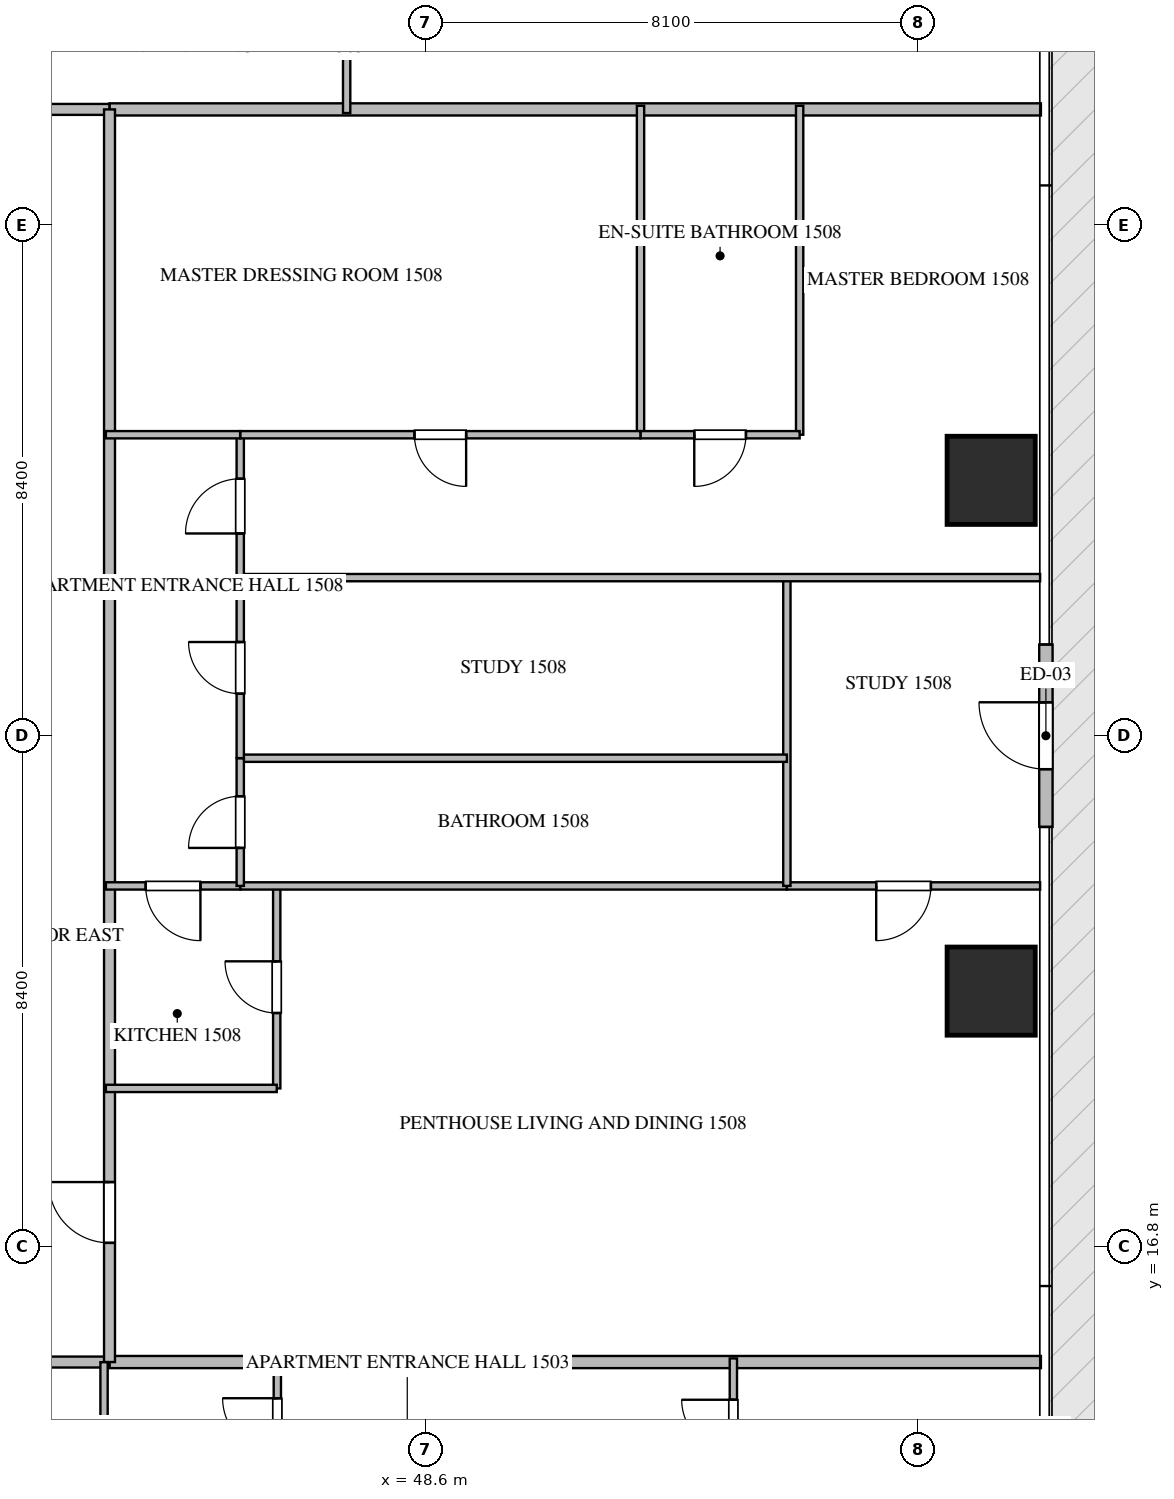
"""IFC4 building model, lengths in metres.
Left out: names, types, materials, properties, quantities, classifications, styles, units other than length and angle.
Written with IfcOpenShell. Run it as: python <this file> out.ifc"""

import sys

from ifc_helpers import new_model, si_unit, direction, frame, frame_2d, origin, origin_2d, place, context, subcontext, project, spatial, rectangle, extrude, source, transform, mapped, element, fill, save


model = new_model("IFC4")
c1 = context("Model", 3, precision=1e-05, world=origin(), true_north=direction((0.0, 1.0)))
c2 = subcontext(c1, "Body", "Model", "MODEL_VIEW")
j1 = project(units=[si_unit("LENGTHUNIT", "METRE"), si_unit("PLANEANGLEUNIT", "RADIAN")], contexts=[c1])
p1 = place(None, origin())
s1 = spatial("IfcSite", under=j1, at=p1, CompositionType="ELEMENT")
p2 = place(p1, origin())
s2 = spatial("IfcBuilding", under=s1, at=p2, CompositionType="ELEMENT")
p3 = place(p2, frame((0.0, 0.0, 64.2)))
s3 = spatial("IfcBuildingStorey", under=s2, at=p3, CompositionType="ELEMENT", Elevation=64.2)
m1 = source(origin(), c2, "Body", "SweptSolid", [
    extrude(rectangle(XDim=1.45, YDim=1.45, at=origin_2d()), origin(), (0.0, 0.0, 1.0), 3.75),
])
for number, where, z_axis, x_axis in (
    (1, (57.9, 21.0, -0.26), (0.0, 0.0, 1.0), (1.0, 0.0, 0.0)),
    (2, (57.9, 29.4, -0.26), (0.0, 0.0, 1.0), (1.0, 0.0, 0.0)),
):
    element("IfcColumn", number, at=place(p3, frame(where, z_axis=z_axis, x_axis=x_axis)), inside=s3, PredefinedType="COLUMN", context=c2, shape_type="MappedRepresentation", body=[
        mapped(m1, transform((0.0, 0.0, 0.0), scale=1.0)),
    ])
p4 = place(p3, frame((58.8, 23.7, 0.0), z_axis=(0.0, 0.0, 1.0), x_axis=(0.0, 1.0, 0.0)))
e3 = element("IfcWall", 3, at=p4, inside=s3, PredefinedType="ELEMENTEDWALL", context=c2, shape_type="SweptSolid", body=[
    extrude(rectangle(XDim=3.0, YDim=0.22, at=frame_2d((1.5, 0.0))), origin(), (0.0, 0.0, 1.0), 3.475),
])
p5 = place(p4, frame((0.95, 0.0, 0.0)))
e4 = element("IfcOpeningElement", 4, at=p5, cuts=e3, PredefinedType="OPENING", context=c2, shape_type="SweptSolid", body=[
    extrude(rectangle(XDim=1.1, YDim=2.2, at=frame_2d((0.55, 1.1))), frame((0.0, 0.12, 0.0), z_axis=(0.0, -1.0, 0.0), x_axis=(1.0, 0.0, 0.0)), (0.0, 0.0, 1.0), 0.24),
])
for number, where, z_axis, x_axis in (
    (5, (43.4, 14.9, 0.0), (0.0, 0.0, 1.0), (1.0, 0.0, 0.0)),
    (6, (43.4, 35.5, 0.0), (0.0, 0.0, 1.0), (1.0, 0.0, 0.0)),
):
    element("IfcWall", number, at=place(p3, frame(where, z_axis=z_axis, x_axis=x_axis)), inside=s3, PredefinedType="PARTITIONING", context=c2, shape_type="SweptSolid", body=[
        extrude(rectangle(XDim=15.318, YDim=0.2, at=frame_2d((7.659, 0.0))), origin(), (0.0, 0.0, 1.0), 3.49),
    ])
p6 = place(p3, frame((21.402, 14.9, 0.0), z_axis=(0.0, 0.0, 1.0), x_axis=(1.0, 0.0, 0.0)))
e7 = element("IfcWall", 7, at=p6, inside=s3, PredefinedType="PARTITIONING", context=c2, shape_type="SweptSolid", body=[
    extrude(rectangle(XDim=21.996, YDim=0.18, at=frame_2d((10.998, 0.0))), origin(), (0.0, 0.0, 1.0), 3.49),
])
p7 = place(p6, frame((2.1, 0.0, 0.0)))
e8 = element("IfcOpeningElement", 8, at=p7, cuts=e7, PredefinedType="OPENING", context=c2, shape_type="SweptSolid", body=[
    extrude(rectangle(XDim=1.0, YDim=2.15, at=frame_2d((0.5, 1.075))), frame((0.0, 0.1, 0.0), z_axis=(0.0, -1.0, 0.0), x_axis=(1.0, 0.0, 0.0)), (0.0, 0.0, 1.0), 0.2),
])
p8 = place(p6, frame((6.719, 0.0, 0.0)))
e9 = element("IfcOpeningElement", 9, at=p8, cuts=e7, PredefinedType="OPENING", context=c2, shape_type="SweptSolid", body=[
    extrude(rectangle(XDim=1.0, YDim=2.15, at=frame_2d((0.5, 1.075))), frame((0.0, 0.1, 0.0), z_axis=(0.0, -1.0, 0.0), x_axis=(1.0, 0.0, 0.0)), (0.0, 0.0, 1.0), 0.2),
])
p9 = place(p6, frame((18.896, 0.0, 0.0)))
e10 = element("IfcOpeningElement", 10, at=p9, cuts=e7, PredefinedType="OPENING", context=c2, shape_type="SweptSolid", body=[
    extrude(rectangle(XDim=1.0, YDim=2.15, at=frame_2d((0.5, 1.075))), frame((0.0, 0.1, 0.0), z_axis=(0.0, -1.0, 0.0), x_axis=(1.0, 0.0, 0.0)), (0.0, 0.0, 1.0), 0.2),
])
p10 = place(p3, frame((21.402, 35.5, 0.0), z_axis=(0.0, 0.0, 1.0), x_axis=(1.0, 0.0, 0.0)))
e11 = element("IfcWall", 11, at=p10, inside=s3, PredefinedType="PARTITIONING", context=c2, shape_type="SweptSolid", body=[
    extrude(rectangle(XDim=21.996, YDim=0.18, at=frame_2d((10.998, 0.0))), origin(), (0.0, 0.0, 1.0), 3.49),
])
p11 = place(p10, frame((6.425, 0.0, 0.0)))
e12 = element("IfcOpeningElement", 12, at=p11, cuts=e11, PredefinedType="OPENING", context=c2, shape_type="SweptSolid", body=[
    extrude(rectangle(XDim=1.0, YDim=2.15, at=frame_2d((0.5, 1.075))), frame((0.0, 0.1, 0.0), z_axis=(0.0, -1.0, 0.0), x_axis=(1.0, 0.0, 0.0)), (0.0, 0.0, 1.0), 0.2),
])
p12 = place(p10, frame((13.605, 0.0, 0.0)))
e13 = element("IfcOpeningElement", 13, at=p12, cuts=e11, PredefinedType="OPENING", context=c2, shape_type="SweptSolid", body=[
    extrude(rectangle(XDim=1.0, YDim=2.15, at=frame_2d((0.5, 1.075))), frame((0.0, 0.1, 0.0), z_axis=(0.0, -1.0, 0.0), x_axis=(1.0, 0.0, 0.0)), (0.0, 0.0, 1.0), 0.2),
])
p13 = place(p3, frame((43.4, 14.9, 0.0), z_axis=(0.0, 0.0, 1.0), x_axis=(0.0, 1.0, 0.0)))
e14 = element("IfcWall", 14, at=p13, inside=s3, PredefinedType="PARTITIONING", context=c2, shape_type="SweptSolid", body=[
    extrude(rectangle(XDim=20.6, YDim=0.18, at=frame_2d((10.3, 0.0))), origin(), (0.0, 0.0, 1.0), 3.49),
])
p14 = place(p13, frame((1.96, 0.0, 0.0)))
e15 = element("IfcOpeningElement", 15, at=p14, cuts=e14, PredefinedType="OPENING", context=c2, shape_type="SweptSolid", body=[
    extrude(rectangle(XDim=1.0, YDim=2.15, at=frame_2d((0.5, 1.075))), frame((0.0, 0.1, 0.0), z_axis=(0.0, -1.0, 0.0), x_axis=(1.0, 0.0, 0.0)), (0.0, 0.0, 1.0), 0.2),
])
p15 = place(p3, frame((43.31, 12.15, 0.0), z_axis=(0.0, 0.0, 1.0), x_axis=(0.0, 1.0, 0.0)))
e16 = element("IfcWall", 16, at=p15, inside=s3, PredefinedType="PARTITIONING", context=c2, shape_type="SweptSolid", body=[
    extrude(rectangle(XDim=2.748, YDim=0.12, at=frame_2d((1.374, 0.0))), origin(), (0.0, 0.0, 1.0), 3.49),
])
p16 = place(p3, frame((46.16, 12.75, 0.0), z_axis=(0.0, 0.0, 1.0), x_axis=(0.0, 1.0, 0.0)))
e17 = element("IfcWall", 17, at=p16, inside=s3, PredefinedType="PARTITIONING", context=c2, shape_type="SweptSolid", body=[
    extrude(rectangle(XDim=2.21, YDim=0.12, at=frame_2d((1.105, 0.0))), origin(), (0.0, 0.0, 1.0), 3.49),
])
p17 = place(p16, frame((0.655, 0.0, 0.0)))
e18 = element("IfcOpeningElement", 18, at=p17, cuts=e17, PredefinedType="OPENING", context=c2, shape_type="SweptSolid", body=[
    extrude(rectangle(XDim=0.9, YDim=2.1, at=frame_2d((0.45, 1.05))), frame((0.0, 0.07, 0.0), z_axis=(0.0, -1.0, 0.0), x_axis=(1.0, 0.0, 0.0)), (0.0, 0.0, 1.0), 0.14),
])
p18 = place(p3, frame((53.66, 12.75, 0.0), z_axis=(0.0, 0.0, 1.0), x_axis=(0.0, 1.0, 0.0)))
e19 = element("IfcWall", 19, at=p18, inside=s3, PredefinedType="PARTITIONING", context=c2, shape_type="SweptSolid", body=[
    extrude(rectangle(XDim=2.21, YDim=0.12, at=frame_2d((1.105, 0.0))), origin(), (0.0, 0.0, 1.0), 3.49),
])
p19 = place(p18, frame((0.68, 0.0, 0.0)))
e20 = element("IfcOpeningElement", 20, at=p19, cuts=e19, PredefinedType="OPENING", context=c2, shape_type="SweptSolid", body=[
    extrude(rectangle(XDim=0.85, YDim=2.1, at=frame_2d((0.425, 1.05))), frame((0.0, 0.07, 0.0), z_axis=(0.0, -1.0, 0.0), x_axis=(1.0, 0.0, 0.0)), (0.0, 0.0, 1.0), 0.14),
])
p20 = place(p3, frame((47.3, 37.648, 0.0), z_axis=(0.0, 0.0, 1.0), x_axis=(0.0, -1.0, 0.0)))
e21 = element("IfcWall", 21, at=p20, inside=s3, PredefinedType="PARTITIONING", context=c2, shape_type="SweptSolid", body=[
    extrude(rectangle(XDim=2.208, YDim=0.12, at=frame_2d((1.104, 0.0))), origin(), (0.0, 0.0, 1.0), 3.49),
])
p21 = place(p3, frame((46.15, 19.4, 0.0), z_axis=(0.0, 0.0, 1.0), x_axis=(0.0, 1.0, 0.0)))
e22 = element("IfcWall", 22, at=p21, inside=s3, PredefinedType="PARTITIONING", context=c2, shape_type="SweptSolid", body=[
    extrude(rectangle(XDim=3.33, YDim=0.12, at=frame_2d((1.665, 0.0))), origin(), (0.0, 0.0, 1.0), 3.49),
])
p22 = place(p21, frame((1.24, 0.0, 0.0)))
e23 = element("IfcOpeningElement", 23, at=p22, cuts=e22, PredefinedType="OPENING", context=c2, shape_type="SweptSolid", body=[
    extrude(rectangle(XDim=0.85, YDim=2.1, at=frame_2d((0.425, 1.05))), frame((0.0, 0.07, 0.0), z_axis=(0.0, -1.0, 0.0), x_axis=(1.0, 0.0, 0.0)), (0.0, 0.0, 1.0), 0.14),
])
p23 = place(p3, frame((46.15, 19.4, 0.0), z_axis=(0.0, 0.0, 1.0), x_axis=(-1.0, 0.0, 0.0)))
e24 = element("IfcWall", 24, at=p23, inside=s3, PredefinedType="PARTITIONING", context=c2, shape_type="SweptSolid", body=[
    extrude(rectangle(XDim=2.81, YDim=0.12, at=frame_2d((1.405, 0.0))), origin(), (0.0, 0.0, 1.0), 3.49),
])
p24 = place(p3, frame((45.55, 22.73, 0.0), z_axis=(0.0, 0.0, 1.0), x_axis=(-1.0, 0.0, 0.0)))
e25 = element("IfcWall", 25, at=p24, inside=s3, PredefinedType="PARTITIONING", context=c2, shape_type="SweptSolid", body=[
    extrude(rectangle(XDim=2.21, YDim=0.12, at=frame_2d((1.105, 0.0))), origin(), (0.0, 0.0, 1.0), 3.49),
])
p25 = place(p24, frame((0.655, 0.0, 0.0)))
e26 = element("IfcOpeningElement", 26, at=p25, cuts=e25, PredefinedType="OPENING", context=c2, shape_type="SweptSolid", body=[
    extrude(rectangle(XDim=0.9, YDim=2.1, at=frame_2d((0.45, 1.05))), frame((0.0, 0.07, 0.0), z_axis=(0.0, -1.0, 0.0), x_axis=(1.0, 0.0, 0.0)), (0.0, 0.0, 1.0), 0.14),
])
p26 = place(p3, frame((58.705, 22.73, 0.0), z_axis=(0.0, 0.0, 1.0), x_axis=(-1.0, 0.0, 0.0)))
e27 = element("IfcWall", 27, at=p26, inside=s3, PredefinedType="PARTITIONING", context=c2, shape_type="SweptSolid", body=[
    extrude(rectangle(XDim=4.165, YDim=0.12, at=frame_2d((2.083, 0.0))), origin(), (0.0, 0.0, 1.0), 3.49),
])
p27 = place(p26, frame((1.796, 0.0, 0.0)))
e28 = element("IfcOpeningElement", 28, at=p27, cuts=e27, PredefinedType="OPENING", context=c2, shape_type="SweptSolid", body=[
    extrude(rectangle(XDim=0.9, YDim=2.1, at=frame_2d((0.45, 1.05))), frame((0.0, 0.07, 0.0), z_axis=(0.0, -1.0, 0.0), x_axis=(1.0, 0.0, 0.0)), (0.0, 0.0, 1.0), 0.14),
])
p28 = place(p3, frame((54.538, 22.73, 0.0), z_axis=(0.0, 0.0, 1.0), x_axis=(-1.0, 0.0, 0.0)))
e29 = element("IfcWall", 29, at=p28, inside=s3, PredefinedType="PARTITIONING", context=c2, shape_type="SweptSolid", body=[
    extrude(rectangle(XDim=8.986, YDim=0.12, at=frame_2d((4.493, 0.0))), origin(), (0.0, 0.0, 1.0), 3.49),
])
p29 = place(p3, frame((54.54, 22.73, 0.0), z_axis=(0.0, 0.0, 1.0), x_axis=(0.0, 1.0, 0.0)))
e30 = element("IfcWall", 30, at=p29, inside=s3, PredefinedType="PARTITIONING", context=c2, shape_type="SweptSolid", body=[
    extrude(rectangle(XDim=5.07, YDim=0.12, at=frame_2d((2.535, 0.0))), origin(), (0.0, 0.0, 1.0), 3.49),
])
p30 = place(p3, frame((58.705, 27.8, 0.0), z_axis=(0.0, 0.0, 1.0), x_axis=(-1.0, 0.0, 0.0)))
e31 = element("IfcWall", 31, at=p30, inside=s3, PredefinedType="PARTITIONING", context=c2, shape_type="SweptSolid", body=[
    extrude(rectangle(XDim=13.155, YDim=0.12, at=frame_2d((6.578, 0.0))), origin(), (0.0, 0.0, 1.0), 3.49),
])
p31 = place(p3, frame((54.54, 24.83, 0.0), z_axis=(0.0, 0.0, 1.0), x_axis=(-1.0, 0.0, 0.0)))
e32 = element("IfcWall", 32, at=p31, inside=s3, PredefinedType="PARTITIONING", context=c2, shape_type="SweptSolid", body=[
    extrude(rectangle(XDim=8.99, YDim=0.12, at=frame_2d((4.495, 0.0))), origin(), (0.0, 0.0, 1.0), 3.49),
])
p32 = place(p3, frame((45.55, 22.73, 0.0), z_axis=(0.0, 0.0, 1.0), x_axis=(0.0, 1.0, 0.0)))
e33 = element("IfcWall", 33, at=p32, inside=s3, PredefinedType="PARTITIONING", context=c2, shape_type="SweptSolid", body=[
    extrude(rectangle(XDim=2.1, YDim=0.12, at=frame_2d((1.05, 0.0))), origin(), (0.0, 0.0, 1.0), 3.49),
])
p33 = place(p32, frame((0.625, 0.0, 0.0)))
e34 = element("IfcOpeningElement", 34, at=p33, cuts=e33, PredefinedType="OPENING", context=c2, shape_type="SweptSolid", body=[
    extrude(rectangle(XDim=0.85, YDim=2.1, at=frame_2d((0.425, 1.05))), frame((0.0, 0.07, 0.0), z_axis=(0.0, -1.0, 0.0), x_axis=(1.0, 0.0, 0.0)), (0.0, 0.0, 1.0), 0.14),
])
p34 = place(p3, frame((45.55, 24.832, 0.0), z_axis=(0.0, 0.0, 1.0), x_axis=(0.0, 1.0, 0.0)))
e35 = element("IfcWall", 35, at=p34, inside=s3, PredefinedType="PARTITIONING", context=c2, shape_type="SweptSolid", body=[
    extrude(rectangle(XDim=2.968, YDim=0.12, at=frame_2d((1.484, 0.0))), origin(), (0.0, 0.0, 1.0), 3.49),
])
p35 = place(p34, frame((1.059, 0.0, 0.0)))
e36 = element("IfcOpeningElement", 36, at=p35, cuts=e35, PredefinedType="OPENING", context=c2, shape_type="SweptSolid", body=[
    extrude(rectangle(XDim=0.85, YDim=2.1, at=frame_2d((0.425, 1.05))), frame((0.0, 0.07, 0.0), z_axis=(0.0, -1.0, 0.0), x_axis=(1.0, 0.0, 0.0)), (0.0, 0.0, 1.0), 0.14),
])
p36 = place(p3, frame((45.55, 27.802, 0.0), z_axis=(0.0, 0.0, 1.0), x_axis=(0.0, 1.0, 0.0)))
e37 = element("IfcWall", 37, at=p36, inside=s3, PredefinedType="PARTITIONING", context=c2, shape_type="SweptSolid", body=[
    extrude(rectangle(XDim=2.348, YDim=0.12, at=frame_2d((1.174, 0.0))), origin(), (0.0, 0.0, 1.0), 3.49),
])
p37 = place(p36, frame((0.724, 0.0, 0.0)))
e38 = element("IfcOpeningElement", 38, at=p37, cuts=e37, PredefinedType="OPENING", context=c2, shape_type="SweptSolid", body=[
    extrude(rectangle(XDim=0.9, YDim=2.1, at=frame_2d((0.45, 1.05))), frame((0.0, 0.07, 0.0), z_axis=(0.0, -1.0, 0.0), x_axis=(1.0, 0.0, 0.0)), (0.0, 0.0, 1.0), 0.14),
])
for number, where, z_axis, x_axis in (
    (39, (54.75, 30.15, 0.0), (0.0, 0.0, 1.0), (0.0, 1.0, 0.0)),
    (40, (52.133, 30.15, 0.0), (0.0, 0.0, 1.0), (0.0, 1.0, 0.0)),
):
    element("IfcWall", number, at=place(p3, frame(where, z_axis=z_axis, x_axis=x_axis)), inside=s3, PredefinedType="PARTITIONING", context=c2, shape_type="SweptSolid", body=[
        extrude(rectangle(XDim=5.41, YDim=0.12, at=frame_2d((2.705, 0.0))), origin(), (0.0, 0.0, 1.0), 3.49),
    ])
p38 = place(p3, frame((54.75, 30.15, 0.0), z_axis=(0.0, 0.0, 1.0), x_axis=(-1.0, 0.0, 0.0)))
e41 = element("IfcWall", 41, at=p38, inside=s3, PredefinedType="PARTITIONING", context=c2, shape_type="SweptSolid", body=[
    extrude(rectangle(XDim=2.617, YDim=0.12, at=frame_2d((1.309, 0.0))), origin(), (0.0, 0.0, 1.0), 3.49),
])
p39 = place(p38, frame((0.883, 0.0, 0.0)))
e42 = element("IfcOpeningElement", 42, at=p39, cuts=e41, PredefinedType="OPENING", context=c2, shape_type="SweptSolid", body=[
    extrude(rectangle(XDim=0.85, YDim=2.1, at=frame_2d((0.425, 1.05))), frame((0.0, 0.07, 0.0), z_axis=(0.0, -1.0, 0.0), x_axis=(1.0, 0.0, 0.0)), (0.0, 0.0, 1.0), 0.14),
])
p40 = place(p3, frame((52.131, 30.15, 0.0), z_axis=(0.0, 0.0, 1.0), x_axis=(-1.0, 0.0, 0.0)))
e43 = element("IfcWall", 43, at=p40, inside=s3, PredefinedType="PARTITIONING", context=c2, shape_type="SweptSolid", body=[
    extrude(rectangle(XDim=6.581, YDim=0.12, at=frame_2d((3.291, 0.0))), origin(), (0.0, 0.0, 1.0), 3.49),
])
p41 = place(p40, frame((2.866, 0.0, 0.0)))
e44 = element("IfcOpeningElement", 44, at=p41, cuts=e43, PredefinedType="OPENING", context=c2, shape_type="SweptSolid", body=[
    extrude(rectangle(XDim=0.85, YDim=2.1, at=frame_2d((0.425, 1.05))), frame((0.0, 0.07, 0.0), z_axis=(0.0, -1.0, 0.0), x_axis=(1.0, 0.0, 0.0)), (0.0, 0.0, 1.0), 0.14),
])
p42 = place(p3, frame((45.548, 30.15, 0.0), z_axis=(0.0, 0.0, 1.0), x_axis=(-1.0, 0.0, 0.0)))
e45 = element("IfcWall", 45, at=p42, inside=s3, PredefinedType="PARTITIONING", context=c2, shape_type="SweptSolid", body=[
    extrude(rectangle(XDim=2.208, YDim=0.12, at=frame_2d((1.104, 0.0))), origin(), (0.0, 0.0, 1.0), 3.49),
])
m2 = source(origin(), c2, "Body", "SweptSolid", [
    extrude(rectangle(XDim=1.1, YDim=2.2, at=frame_2d((0.55, 1.1))), frame((0.0, 0.025, 0.0), z_axis=(0.0, -1.0, 0.0), x_axis=(1.0, 0.0, 0.0)), (0.0, 0.0, 1.0), 0.05),
])
p43 = place(p5, origin())
e46 = element("IfcDoor", 46, at=p43, inside=s3, OperationType="SINGLE_SWING_RIGHT", PredefinedType="DOOR", context=c2, shape_type="MappedRepresentation", body=[
    mapped(m2, transform((0.0, 0.0, 0.0), scale=1.0)),
])
fill(e4, e46)
m3 = source(origin(), c2, "Body", "SweptSolid", [
    extrude(rectangle(XDim=1.0, YDim=2.15, at=frame_2d((0.5, 1.075))), frame((0.0, 0.025, 0.0), z_axis=(0.0, -1.0, 0.0), x_axis=(1.0, 0.0, 0.0)), (0.0, 0.0, 1.0), 0.05),
])
p44 = place(p14, origin())
e47 = element("IfcDoor", 47, at=p44, inside=s3, OperationType="SINGLE_SWING_RIGHT", PredefinedType="DOOR", context=c2, shape_type="MappedRepresentation", body=[
    mapped(m3, transform((0.0, 0.0, 0.0), scale=1.0)),
])
fill(e15, e47)
m4 = source(origin(), c2, "Body", "SweptSolid", [
    extrude(rectangle(XDim=0.9, YDim=2.1, at=frame_2d((0.45, 1.05))), frame((0.0, 0.025, 0.0), z_axis=(0.0, -1.0, 0.0), x_axis=(1.0, 0.0, 0.0)), (0.0, 0.0, 1.0), 0.05),
])
p45 = place(p17, origin())
e48 = element("IfcDoor", 48, at=p45, inside=s3, OperationType="SINGLE_SWING_RIGHT", PredefinedType="DOOR", context=c2, shape_type="MappedRepresentation", body=[
    mapped(m4, transform((0.0, 0.0, 0.0), scale=1.0)),
])
fill(e18, e48)
m5 = source(origin(), c2, "Body", "SweptSolid", [
    extrude(rectangle(XDim=0.85, YDim=2.1, at=frame_2d((0.425, 1.05))), frame((0.0, 0.025, 0.0), z_axis=(0.0, -1.0, 0.0), x_axis=(1.0, 0.0, 0.0)), (0.0, 0.0, 1.0), 0.05),
])
p46 = place(p19, origin())
e49 = element("IfcDoor", 49, at=p46, inside=s3, OperationType="SINGLE_SWING_RIGHT", PredefinedType="DOOR", context=c2, shape_type="MappedRepresentation", body=[
    mapped(m5, transform((0.0, 0.0, 0.0), scale=1.0)),
])
fill(e20, e49)
p47 = place(p22, origin())
e50 = element("IfcDoor", 50, at=p47, inside=s3, OperationType="SINGLE_SWING_RIGHT", PredefinedType="DOOR", context=c2, shape_type="MappedRepresentation", body=[
    mapped(m5, transform((0.0, 0.0, 0.0), scale=1.0)),
])
fill(e23, e50)
p48 = place(p25, origin())
e51 = element("IfcDoor", 51, at=p48, inside=s3, OperationType="SINGLE_SWING_LEFT", PredefinedType="DOOR", context=c2, shape_type="MappedRepresentation", body=[
    mapped(m4, transform((0.0, 0.0, 0.0), scale=1.0)),
])
fill(e26, e51)
p49 = place(p27, origin())
e52 = element("IfcDoor", 52, at=p49, inside=s3, OperationType="SINGLE_SWING_RIGHT", PredefinedType="DOOR", context=c2, shape_type="MappedRepresentation", body=[
    mapped(m4, transform((0.0, 0.0, 0.0), scale=1.0)),
])
fill(e28, e52)
p50 = place(p33, origin())
e53 = element("IfcDoor", 53, at=p50, inside=s3, OperationType="SINGLE_SWING_LEFT", PredefinedType="DOOR", context=c2, shape_type="MappedRepresentation", body=[
    mapped(m5, transform((0.0, 0.0, 0.0), scale=1.0)),
])
fill(e34, e53)
p51 = place(p35, origin())
e54 = element("IfcDoor", 54, at=p51, inside=s3, OperationType="SINGLE_SWING_RIGHT", PredefinedType="DOOR", context=c2, shape_type="MappedRepresentation", body=[
    mapped(m5, transform((0.0, 0.0, 0.0), scale=1.0)),
])
fill(e36, e54)
p52 = place(p37, origin())
e55 = element("IfcDoor", 55, at=p52, inside=s3, OperationType="SINGLE_SWING_LEFT", PredefinedType="DOOR", context=c2, shape_type="MappedRepresentation", body=[
    mapped(m4, transform((0.0, 0.0, 0.0), scale=1.0)),
])
fill(e38, e55)
p53 = place(p39, origin())
e56 = element("IfcDoor", 56, at=p53, inside=s3, OperationType="SINGLE_SWING_RIGHT", PredefinedType="DOOR", context=c2, shape_type="MappedRepresentation", body=[
    mapped(m5, transform((0.0, 0.0, 0.0), scale=1.0)),
])
fill(e42, e56)
p54 = place(p41, origin())
e57 = element("IfcDoor", 57, at=p54, inside=s3, OperationType="SINGLE_SWING_LEFT", PredefinedType="DOOR", context=c2, shape_type="MappedRepresentation", body=[
    mapped(m5, transform((0.0, 0.0, 0.0), scale=1.0)),
])
fill(e44, e57)
save(model, sys.argv[1])
